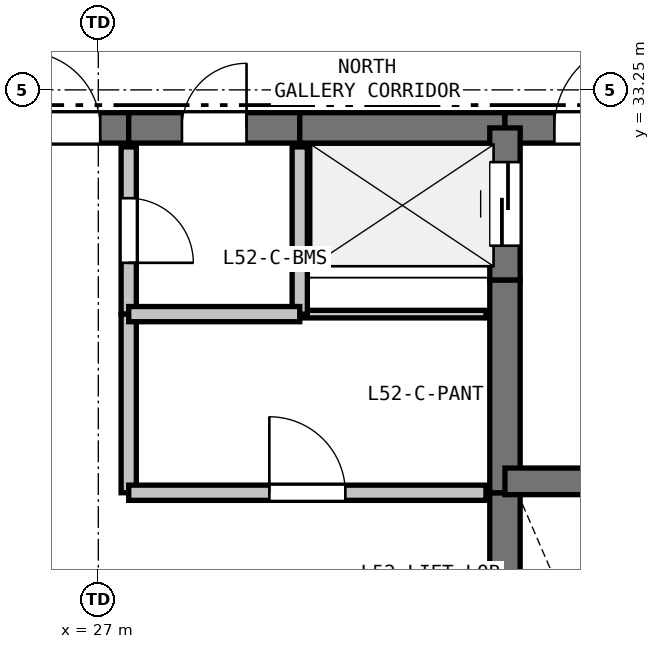
"""IFC4 building model, lengths in metres.
Left out: names, types, materials, properties, quantities, classifications, styles, units other than length and angle.
Written with IfcOpenShell. Run it as: python <this file> out.ifc"""

import sys

from ifc_helpers import new_model, si_unit, direction, frame, frame_2d, origin, place, context, subcontext, project, spatial, rectangle, extrude, element, fill, save


model = new_model("IFC4")
c1 = context("Model", 3, precision=1e-05, world=origin(), true_north=direction((0.0, 1.0)))
c2 = subcontext(c1, "Body", "Model", "MODEL_VIEW")
j1 = project(units=[si_unit("LENGTHUNIT", "METRE"), si_unit("PLANEANGLEUNIT", "RADIAN")], contexts=[c1])
p1 = place(None, origin())
s1 = spatial("IfcSite", under=j1, at=p1, CompositionType="ELEMENT")
p2 = place(p1, origin())
s2 = spatial("IfcBuilding", under=s1, at=p2, CompositionType="ELEMENT")
p3 = place(p2, frame((0.0, 0.0, 188.7)))
s3 = spatial("IfcBuildingStorey", under=s2, at=p3, CompositionType="ELEMENT", Elevation=188.7)
p4 = place(p3, frame((25.65, 32.75, 0.0), z_axis=(0.0, 0.0, 1.0), x_axis=(1.0, 0.0, 0.0)))
e1 = element("IfcWall", 1, at=p4, inside=s3, PredefinedType="SHEAR", context=c2, shape_type="SweptSolid", body=[
    extrude(rectangle(XDim=1.75, YDim=0.4, at=frame_2d((0.875, 0.0))), origin(), (0.0, 0.0, 1.0), 3.07),
])
p5 = place(p4, frame((0.375, 0.0, 0.0)))
e2 = element("IfcOpeningElement", 2, at=p5, cuts=e1, PredefinedType="OPENING", context=c2, shape_type="SweptSolid", body=[
    extrude(rectangle(XDim=1.0, YDim=2.15, at=frame_2d((0.5, 1.075))), frame((0.0, 0.21, 0.0), z_axis=(0.0, -1.0, 0.0), x_axis=(1.0, 0.0, 0.0)), (0.0, 0.0, 1.0), 0.42),
])
p6 = place(p3, frame((27.4, 32.75, 0.0), z_axis=(0.0, 0.0, 1.0), x_axis=(1.0, 0.0, 0.0)))
e3 = element("IfcWall", 3, at=p6, inside=s3, PredefinedType="SHEAR", context=c2, shape_type="SweptSolid", body=[
    extrude(rectangle(XDim=2.25, YDim=0.4, at=frame_2d((1.125, 0.0))), origin(), (0.0, 0.0, 1.0), 3.07),
])
p7 = place(p6, frame((0.7, 0.0, 0.0)))
e4 = element("IfcOpeningElement", 4, at=p7, cuts=e3, PredefinedType="OPENING", context=c2, shape_type="SweptSolid", body=[
    extrude(rectangle(XDim=0.85, YDim=2.1, at=frame_2d((0.425, 1.05))), frame((0.0, 0.21, 0.0), z_axis=(0.0, -1.0, 0.0), x_axis=(1.0, 0.0, 0.0)), (0.0, 0.0, 1.0), 0.42),
])
p8 = place(p3, frame((29.65, 32.75, 0.0), z_axis=(0.0, 0.0, 1.0), x_axis=(1.0, 0.0, 0.0)))
e5 = element("IfcWall", 5, at=p8, inside=s3, PredefinedType="SHEAR", context=c2, shape_type="SweptSolid", body=[
    extrude(rectangle(XDim=2.7, YDim=0.4, at=frame_2d((1.35, 0.0))), origin(), (0.0, 0.0, 1.0), 3.07),
])
p9 = place(p3, frame((32.35, 32.75, 0.0), z_axis=(0.0, 0.0, 1.0), x_axis=(1.0, 0.0, 0.0)))
e6 = element("IfcWall", 6, at=p9, inside=s3, PredefinedType="SHEAR", context=c2, shape_type="SweptSolid", body=[
    extrude(rectangle(XDim=3.45, YDim=0.4, at=frame_2d((1.725, 0.0))), origin(), (0.0, 0.0, 1.0), 3.07),
])
p10 = place(p9, frame((0.65, 0.0, 0.0)))
e7 = element("IfcOpeningElement", 7, at=p10, cuts=e6, PredefinedType="OPENING", context=c2, shape_type="SweptSolid", body=[
    extrude(rectangle(XDim=1.15, YDim=2.15, at=frame_2d((0.575, 1.075))), frame((0.0, 0.21, 0.0), z_axis=(0.0, -1.0, 0.0), x_axis=(1.0, 0.0, 0.0)), (0.0, 0.0, 1.0), 0.42),
])
p11 = place(p3, frame((32.35, 25.55, 0.0), z_axis=(0.0, 0.0, 1.0), x_axis=(0.0, 1.0, 0.0)))
e8 = element("IfcWall", 8, at=p11, inside=s3, PredefinedType="SHEAR", context=c2, shape_type="SweptSolid", body=[
    extrude(rectangle(XDim=2.4, YDim=0.4, at=frame_2d((1.2, 0.0))), origin(), (0.0, 0.0, 1.0), 3.07),
])
p12 = place(p3, frame((32.35, 27.95, 0.0), z_axis=(0.0, 0.0, 1.0), x_axis=(0.0, 1.0, 0.0)))
e9 = element("IfcWall", 9, at=p12, inside=s3, PredefinedType="SHEAR", context=c2, shape_type="SweptSolid", body=[
    extrude(rectangle(XDim=2.8, YDim=0.4, at=frame_2d((1.4, 0.0))), origin(), (0.0, 0.0, 1.0), 3.07),
])
p13 = place(p3, frame((32.35, 30.75, 0.0), z_axis=(0.0, 0.0, 1.0), x_axis=(0.0, 1.0, 0.0)))
e10 = element("IfcWall", 10, at=p13, inside=s3, PredefinedType="SHEAR", context=c2, shape_type="SweptSolid", body=[
    extrude(rectangle(XDim=2.0, YDim=0.4, at=frame_2d((1.0, 0.0))), origin(), (0.0, 0.0, 1.0), 3.07),
])
p14 = place(p13, frame((0.45, 0.0, 0.0)))
e11 = element("IfcOpeningElement", 11, at=p14, cuts=e10, PredefinedType="OPENING", context=c2, shape_type="SweptSolid", body=[
    extrude(rectangle(XDim=1.1, YDim=2.15, at=frame_2d((0.55, 1.075))), frame((0.0, 0.21, 0.0), z_axis=(0.0, -1.0, 0.0), x_axis=(1.0, 0.0, 0.0)), (0.0, 0.0, 1.0), 0.42),
])
p15 = place(p3, frame((32.35, 28.1, 0.0), z_axis=(0.0, 0.0, 1.0), x_axis=(1.0, 0.0, 0.0)))
e12 = element("IfcWall", 12, at=p15, inside=s3, PredefinedType="SHEAR", context=c2, shape_type="SweptSolid", body=[
    extrude(rectangle(XDim=3.45, YDim=0.35, at=frame_2d((1.725, 0.0))), origin(), (0.0, 0.0, 1.0), 3.07),
])
p16 = place(p15, frame((1.15, 0.0, 0.0)))
e13 = element("IfcOpeningElement", 13, at=p16, cuts=e12, PredefinedType="OPENING", context=c2, shape_type="SweptSolid", body=[
    extrude(rectangle(XDim=1.15, YDim=2.15, at=frame_2d((0.575, 1.075))), frame((0.0, 0.185, 0.0), z_axis=(0.0, -1.0, 0.0), x_axis=(1.0, 0.0, 0.0)), (0.0, 0.0, 1.0), 0.37),
])
p17 = place(p3, frame((32.1, 30.3, 0.0), z_axis=(0.0, 0.0, 1.0), x_axis=(-1.0, 0.0, 0.0)))
e14 = element("IfcWall", 14, at=p17, inside=s3, PredefinedType="PARTITIONING", context=c2, shape_type="SweptSolid", body=[
    extrude(rectangle(XDim=2.45, YDim=0.1, at=frame_2d((1.225, 0.0))), origin(), (0.0, 0.0, 1.0), 3.07),
])
p18 = place(p3, frame((29.65, 30.3, 0.0), z_axis=(0.0, 0.0, 1.0), x_axis=(0.0, 1.0, 0.0)))
e15 = element("IfcWall", 15, at=p18, inside=s3, PredefinedType="PARTITIONING", context=c2, shape_type="SweptSolid", body=[
    extrude(rectangle(XDim=2.2, YDim=0.2, at=frame_2d((1.1, 0.0))), origin(), (0.0, 0.0, 1.0), 3.07),
])
p19 = place(p3, frame((27.4, 32.5, 0.0), z_axis=(0.0, 0.0, 1.0), x_axis=(0.0, -1.0, 0.0)))
e16 = element("IfcWall", 16, at=p19, inside=s3, PredefinedType="PARTITIONING", context=c2, shape_type="SweptSolid", body=[
    extrude(rectangle(XDim=2.2, YDim=0.2, at=frame_2d((1.1, 0.0))), origin(), (0.0, 0.0, 1.0), 3.07),
])
p20 = place(p19, frame((0.675, 0.0, 0.0)))
e17 = element("IfcOpeningElement", 17, at=p20, cuts=e16, PredefinedType="OPENING", context=c2, shape_type="SweptSolid", body=[
    extrude(rectangle(XDim=0.85, YDim=2.1, at=frame_2d((0.425, 1.05))), frame((0.0, 0.11, 0.0), z_axis=(0.0, -1.0, 0.0), x_axis=(1.0, 0.0, 0.0)), (0.0, 0.0, 1.0), 0.22),
])
p21 = place(p3, frame((27.4, 30.3, 0.0), z_axis=(0.0, 0.0, 1.0), x_axis=(0.0, -1.0, 0.0)))
e18 = element("IfcWall", 18, at=p21, inside=s3, PredefinedType="PARTITIONING", context=c2, shape_type="SweptSolid", body=[
    extrude(rectangle(XDim=2.35, YDim=0.2, at=frame_2d((1.175, 0.0))), origin(), (0.0, 0.0, 1.0), 3.07),
])
p22 = place(p3, frame((27.4, 27.95, 0.0), z_axis=(0.0, 0.0, 1.0), x_axis=(1.0, 0.0, 0.0)))
e19 = element("IfcWall", 19, at=p22, inside=s3, PredefinedType="PARTITIONING", context=c2, shape_type="SweptSolid", body=[
    extrude(rectangle(XDim=4.7, YDim=0.2, at=frame_2d((2.35, 0.0))), origin(), (0.0, 0.0, 1.0), 3.07),
])
p23 = place(p22, frame((1.85, 0.0, 0.0)))
e20 = element("IfcOpeningElement", 20, at=p23, cuts=e19, PredefinedType="OPENING", context=c2, shape_type="SweptSolid", body=[
    extrude(rectangle(XDim=1.0, YDim=2.15, at=frame_2d((0.5, 1.075))), frame((0.0, 0.11, 0.0), z_axis=(0.0, -1.0, 0.0), x_axis=(1.0, 0.0, 0.0)), (0.0, 0.0, 1.0), 0.22),
])
p24 = place(p3, frame((27.4, 30.3, 0.0), z_axis=(0.0, 0.0, 1.0), x_axis=(1.0, 0.0, 0.0)))
e21 = element("IfcWall", 21, at=p24, inside=s3, PredefinedType="PARTITIONING", context=c2, shape_type="SweptSolid", body=[
    extrude(rectangle(XDim=2.25, YDim=0.2, at=frame_2d((1.125, 0.0))), origin(), (0.0, 0.0, 1.0), 3.07),
])
p25 = place(p5, origin())
e22 = element("IfcDoor", 22, at=p25, inside=s3, OperationType="SINGLE_SWING_LEFT", PredefinedType="DOOR", context=c2, shape_type="SweptSolid", body=[
    extrude(rectangle(XDim=1.0, YDim=2.15, at=frame_2d((0.5, 1.075))), frame((0.0, 0.025, 0.0), z_axis=(0.0, -1.0, 0.0), x_axis=(1.0, 0.0, 0.0)), (0.0, 0.0, 1.0), 0.05),
])
fill(e2, e22)
p26 = place(p14, origin())
e23 = element("IfcDoor", 23, at=p26, inside=s3, OperationType="SLIDING_TO_LEFT", PredefinedType="DOOR", context=c2, shape_type="SweptSolid", body=[
    extrude(rectangle(XDim=1.1, YDim=2.15, at=frame_2d((0.55, 1.075))), frame((0.0, 0.025, 0.0), z_axis=(0.0, -1.0, 0.0), x_axis=(1.0, 0.0, 0.0)), (0.0, 0.0, 1.0), 0.05),
])
fill(e11, e23)
p27 = place(p10, origin())
e24 = element("IfcDoor", 24, at=p27, inside=s3, OperationType="SINGLE_SWING_RIGHT", PredefinedType="DOOR", context=c2, shape_type="SweptSolid", body=[
    extrude(rectangle(XDim=1.15, YDim=2.15, at=frame_2d((0.575, 1.075))), frame((0.0, 0.025, 0.0), z_axis=(0.0, -1.0, 0.0), x_axis=(1.0, 0.0, 0.0)), (0.0, 0.0, 1.0), 0.05),
])
fill(e7, e24)
p28 = place(p23, origin())
e25 = element("IfcDoor", 25, at=p28, inside=s3, OperationType="SINGLE_SWING_LEFT", PredefinedType="DOOR", context=c2, shape_type="SweptSolid", body=[
    extrude(rectangle(XDim=1.0, YDim=2.15, at=frame_2d((0.5, 1.075))), frame((0.0, 0.025, 0.0), z_axis=(0.0, -1.0, 0.0), x_axis=(1.0, 0.0, 0.0)), (0.0, 0.0, 1.0), 0.05),
])
fill(e20, e25)
p29 = place(p20, origin())
e26 = element("IfcDoor", 26, at=p29, inside=s3, OperationType="SINGLE_SWING_RIGHT", PredefinedType="DOOR", context=c2, shape_type="SweptSolid", body=[
    extrude(rectangle(XDim=0.85, YDim=2.1, at=frame_2d((0.425, 1.05))), frame((0.0, 0.025, 0.0), z_axis=(0.0, -1.0, 0.0), x_axis=(1.0, 0.0, 0.0)), (0.0, 0.0, 1.0), 0.05),
])
fill(e17, e26)
p30 = place(p7, origin())
e27 = element("IfcDoor", 27, at=p30, inside=s3, OperationType="SINGLE_SWING_RIGHT", PredefinedType="DOOR", context=c2, shape_type="SweptSolid", body=[
    extrude(rectangle(XDim=0.85, YDim=2.1, at=frame_2d((0.425, 1.05))), frame((0.0, 0.025, 0.0), z_axis=(0.0, -1.0, 0.0), x_axis=(1.0, 0.0, 0.0)), (0.0, 0.0, 1.0), 0.05),
])
fill(e4, e27)
save(model, sys.argv[1])
